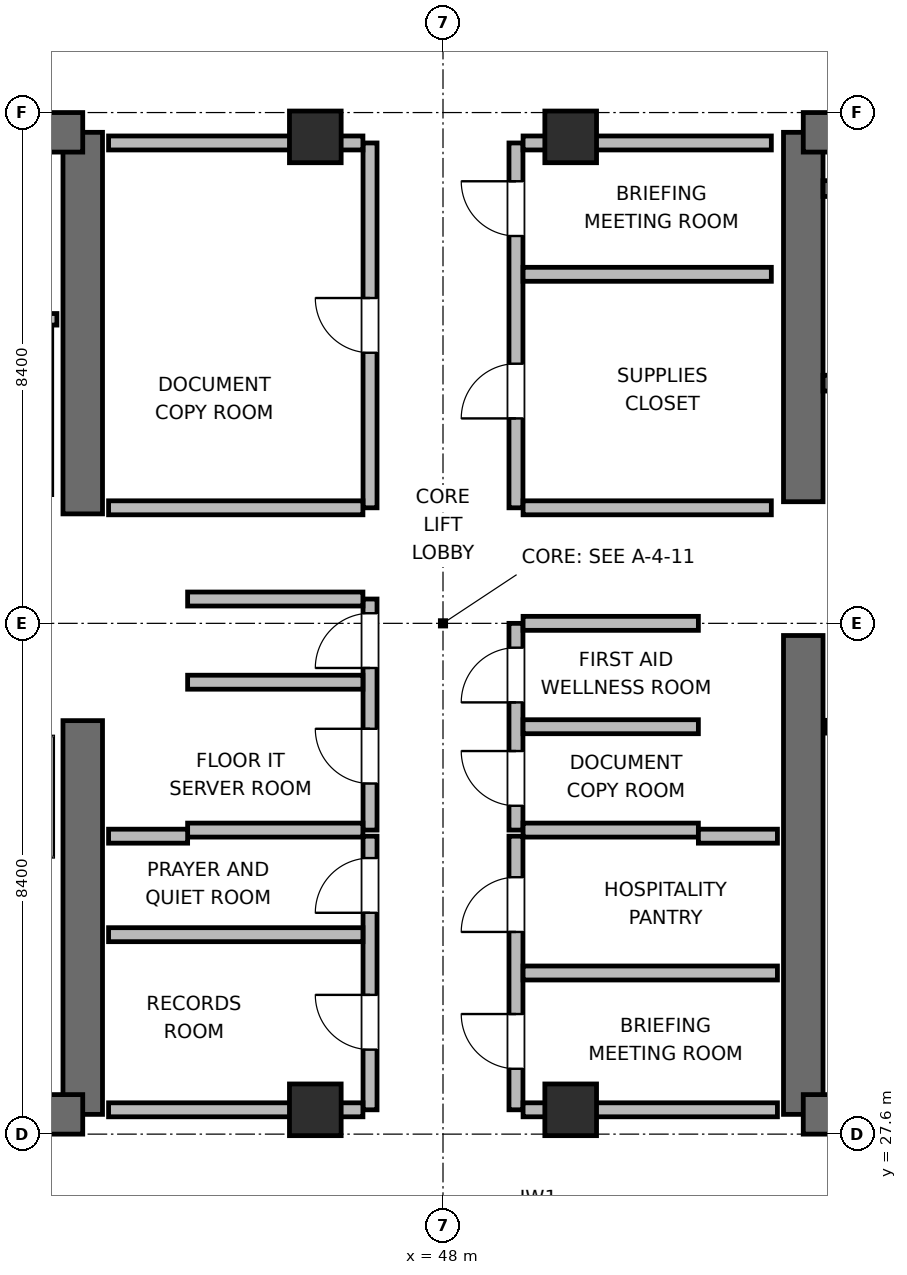
"""IFC4 building model, lengths in metres.
Left out: names, types, materials, properties, quantities, classifications, styles, units other than length and angle.
Written with IfcOpenShell. Run it as: python <this file> out.ifc"""

import sys

from ifc_helpers import new_model, si_unit, direction, frame, frame_2d, origin, origin_2d, place, context, subcontext, project, spatial, rectangle, extrude, element, fill, save


model = new_model("IFC4")
c1 = context("Model", 3, precision=1e-05, world=origin(), true_north=direction((0.0, 1.0)))
c2 = subcontext(c1, "Body", "Model", "MODEL_VIEW")
j1 = project(units=[si_unit("LENGTHUNIT", "METRE"), si_unit("PLANEANGLEUNIT", "RADIAN")], contexts=[c1])
p1 = place(None, origin())
s1 = spatial("IfcSite", under=j1, at=p1, CompositionType="ELEMENT")
p2 = place(p1, origin())
s2 = spatial("IfcBuilding", under=s1, at=p2, CompositionType="ELEMENT")
p3 = place(p2, frame((0.0, 0.0, 255.0)))
s3 = spatial("IfcBuildingStorey", under=s2, at=p3, CompositionType="ELEMENT", Elevation=255.0)
p4 = place(p3, frame((42.075, 27.925, 0.0), z_axis=(0.0, 0.0, 1.0), x_axis=(0.0, 1.0, 0.0)))
e1 = element("IfcWall", 1, at=p4, inside=s3, PredefinedType="SHEAR", context=c2, shape_type="SweptSolid", body=[
    extrude(rectangle(XDim=6.475, YDim=0.65, at=frame_2d((3.237, 0.0))), origin(), (0.0, 0.0, 1.0), 3.9),
])
p5 = place(p3, frame((42.075, 37.8, 0.0), z_axis=(0.0, 0.0, 1.0), x_axis=(0.0, 1.0, 0.0)))
e2 = element("IfcWall", 2, at=p5, inside=s3, PredefinedType="SHEAR", context=c2, shape_type="SweptSolid", body=[
    extrude(rectangle(XDim=6.275, YDim=0.65, at=frame_2d((3.137, 0.0))), origin(), (0.0, 0.0, 1.0), 3.9),
])
p6 = place(p3, frame((32.725, 27.925, 0.0), z_axis=(0.0, 0.0, 1.0), x_axis=(1.0, 0.0, 0.0)))
e3 = element("IfcWall", 3, at=p6, inside=s3, PredefinedType="SHEAR", context=c2, shape_type="SweptSolid", body=[
    extrude(rectangle(XDim=9.35, YDim=0.65, at=frame_2d((4.675, 0.0))), origin(), (0.0, 0.0, 1.0), 3.9),
])
p7 = place(p6, frame((5.075, 0.0, 0.0)))
e4 = element("IfcOpeningElement", 4, at=p7, cuts=e3, PredefinedType="OPENING", context=c2, shape_type="SweptSolid", body=[
    extrude(rectangle(XDim=1.05, YDim=2.04, at=frame_2d((0.525, 1.02))), frame((0.0, 0.335, 0.0), z_axis=(0.0, -1.0, 0.0), x_axis=(1.0, 0.0, 0.0)), (0.0, 0.0, 1.0), 0.67),
])
p8 = place(p3, frame((32.725, 44.075, 0.0), z_axis=(0.0, 0.0, 1.0), x_axis=(1.0, 0.0, 0.0)))
e5 = element("IfcWall", 5, at=p8, inside=s3, PredefinedType="SHEAR", context=c2, shape_type="SweptSolid", body=[
    extrude(rectangle(XDim=9.35, YDim=0.65, at=frame_2d((4.675, 0.0))), origin(), (0.0, 0.0, 1.0), 3.9),
])
p9 = place(p8, frame((1.075, 0.0, 0.0)))
e6 = element("IfcOpeningElement", 6, at=p9, cuts=e5, PredefinedType="OPENING", context=c2, shape_type="SweptSolid", body=[
    extrude(rectangle(XDim=0.95, YDim=2.04, at=frame_2d((0.475, 1.02))), frame((0.0, 0.335, 0.0), z_axis=(0.0, -1.0, 0.0), x_axis=(1.0, 0.0, 0.0)), (0.0, 0.0, 1.0), 0.67),
])
p10 = place(p8, frame((4.325, 0.0, 0.0)))
e7 = element("IfcOpeningElement", 7, at=p10, cuts=e5, PredefinedType="OPENING", context=c2, shape_type="SweptSolid", body=[
    extrude(rectangle(XDim=0.9, YDim=2.02, at=frame_2d((0.45, 1.01))), frame((0.0, 0.335, 0.0), z_axis=(0.0, -1.0, 0.0), x_axis=(1.0, 0.0, 0.0)), (0.0, 0.0, 1.0), 0.67),
])
p11 = place(p8, frame((7.225, 0.0, 0.0)))
e8 = element("IfcOpeningElement", 8, at=p11, cuts=e5, PredefinedType="OPENING", context=c2, shape_type="SweptSolid", body=[
    extrude(rectangle(XDim=0.9, YDim=2.02, at=frame_2d((0.45, 1.01))), frame((0.0, 0.335, 0.0), z_axis=(0.0, -1.0, 0.0), x_axis=(1.0, 0.0, 0.0)), (0.0, 0.0, 1.0), 0.67),
])
p12 = place(p3, frame((53.925, 27.925, 0.0), z_axis=(0.0, 0.0, 1.0), x_axis=(0.0, 1.0, 0.0)))
e9 = element("IfcWall", 9, at=p12, inside=s3, PredefinedType="SHEAR", context=c2, shape_type="SweptSolid", body=[
    extrude(rectangle(XDim=7.875, YDim=0.65, at=frame_2d((3.938, 0.0))), origin(), (0.0, 0.0, 1.0), 3.9),
])
p13 = place(p3, frame((53.925, 38.0, 0.0), z_axis=(0.0, 0.0, 1.0), x_axis=(0.0, 1.0, 0.0)))
e10 = element("IfcWall", 10, at=p13, inside=s3, PredefinedType="SHEAR", context=c2, shape_type="SweptSolid", body=[
    extrude(rectangle(XDim=6.075, YDim=0.65, at=frame_2d((3.038, 0.0))), origin(), (0.0, 0.0, 1.0), 3.9),
])
p14 = place(p3, frame((53.925, 27.925, 0.0), z_axis=(0.0, 0.0, 1.0), x_axis=(1.0, 0.0, 0.0)))
e11 = element("IfcWall", 11, at=p14, inside=s3, PredefinedType="SHEAR", context=c2, shape_type="SweptSolid", body=[
    extrude(rectangle(XDim=9.35, YDim=0.65, at=frame_2d((4.675, 0.0))), origin(), (0.0, 0.0, 1.0), 3.9),
])
p15 = place(p14, frame((4.025, 0.0, 0.0)))
e12 = element("IfcOpeningElement", 12, at=p15, cuts=e11, PredefinedType="OPENING", context=c2, shape_type="SweptSolid", body=[
    extrude(rectangle(XDim=1.05, YDim=2.04, at=frame_2d((0.525, 1.02))), frame((0.0, 0.335, 0.0), z_axis=(0.0, -1.0, 0.0), x_axis=(1.0, 0.0, 0.0)), (0.0, 0.0, 1.0), 0.67),
])
p16 = place(p3, frame((53.925, 44.075, 0.0), z_axis=(0.0, 0.0, 1.0), x_axis=(1.0, 0.0, 0.0)))
e13 = element("IfcWall", 13, at=p16, inside=s3, PredefinedType="SHEAR", context=c2, shape_type="SweptSolid", body=[
    extrude(rectangle(XDim=9.35, YDim=0.65, at=frame_2d((4.675, 0.0))), origin(), (0.0, 0.0, 1.0), 3.9),
])
p17 = place(p3, frame((54.25, 39.95, 0.0), z_axis=(0.0, 0.0, 1.0), x_axis=(1.0, 0.0, 0.0)))
e14 = element("IfcWall", 14, at=p17, inside=s3, PredefinedType="SHEAR", context=c2, shape_type="SweptSolid", body=[
    extrude(rectangle(XDim=8.7, YDim=0.26, at=frame_2d((4.35, 0.0))), origin(), (0.0, 0.0, 1.0), 3.9),
])
p18 = place(p17, frame((0.95, 0.0, 0.0)))
e15 = element("IfcOpeningElement", 15, at=p18, cuts=e14, PredefinedType="OPENING", context=c2, shape_type="SweptSolid", body=[
    extrude(rectangle(XDim=1.0, YDim=2.04, at=frame_2d((0.5, 1.02))), frame((0.0, 0.14, 0.0), z_axis=(0.0, -1.0, 0.0), x_axis=(1.0, 0.0, 0.0)), (0.0, 0.0, 1.0), 0.28),
])
p19 = place(p3, frame((54.25, 43.15, 0.0), z_axis=(0.0, 0.0, 1.0), x_axis=(1.0, 0.0, 0.0)))
e16 = element("IfcWall", 16, at=p19, inside=s3, PredefinedType="SHEAR", context=c2, shape_type="SweptSolid", body=[
    extrude(rectangle(XDim=8.7, YDim=0.26, at=frame_2d((4.35, 0.0))), origin(), (0.0, 0.0, 1.0), 3.9),
])
for number, where, z_axis, x_axis in (
    (17, (45.9, 28.0, 0.0), (0.0, 0.0, 1.0), (1.0, 0.0, 0.0)),
    (18, (50.1, 28.0, 0.0), (0.0, 0.0, 1.0), (1.0, 0.0, 0.0)),
    (19, (45.9, 44.0, 0.0), (0.0, 0.0, 1.0), (1.0, 0.0, 0.0)),
    (20, (50.1, 44.0, 0.0), (0.0, 0.0, 1.0), (1.0, 0.0, 0.0)),
):
    element("IfcColumn", number, at=place(p3, frame(where, z_axis=z_axis, x_axis=x_axis)), inside=s3, PredefinedType="COLUMN", context=c2, shape_type="SweptSolid", body=[
        extrude(rectangle(XDim=0.85, YDim=0.85, at=origin_2d()), origin(), (0.0, 0.0, 1.0), 3.9),
    ])
p20 = place(p3, frame((33.15, 41.0, 0.0), z_axis=(0.0, 0.0, 1.0), x_axis=(1.0, 0.0, 0.0)))
e21 = element("IfcWall", 21, at=p20, inside=s3, PredefinedType="PLUMBINGWALL", context=c2, shape_type="SweptSolid", body=[
    extrude(rectangle(XDim=8.5, YDim=0.19, at=frame_2d((4.25, 0.0))), origin(), (0.0, 0.0, 1.0), 3.68),
])
p21 = place(p3, frame((46.8, 32.6, 0.0), z_axis=(0.0, 0.0, 1.0), x_axis=(0.0, 1.0, 0.0)))
e22 = element("IfcWall", 22, at=p21, inside=s3, PredefinedType="PARTITIONING", context=c2, shape_type="SweptSolid", body=[
    extrude(rectangle(XDim=3.8, YDim=0.23, at=frame_2d((1.9, 0.0))), origin(), (0.0, 0.0, 1.0), 3.68),
])
p22 = place(p21, frame((0.766, 0.0, 0.0)))
e23 = element("IfcOpeningElement", 23, at=p22, cuts=e22, PredefinedType="OPENING", context=c2, shape_type="SweptSolid", body=[
    extrude(rectangle(XDim=0.9, YDim=2.02, at=frame_2d((0.45, 1.01))), frame((0.0, 0.125, 0.0), z_axis=(0.0, -1.0, 0.0), x_axis=(1.0, 0.0, 0.0)), (0.0, 0.0, 1.0), 0.25),
])
p23 = place(p21, frame((2.666, 0.0, 0.0)))
e24 = element("IfcOpeningElement", 24, at=p23, cuts=e22, PredefinedType="OPENING", context=c2, shape_type="SweptSolid", body=[
    extrude(rectangle(XDim=0.9, YDim=2.02, at=frame_2d((0.45, 1.01))), frame((0.0, 0.125, 0.0), z_axis=(0.0, -1.0, 0.0), x_axis=(1.0, 0.0, 0.0)), (0.0, 0.0, 1.0), 0.25),
])
for number, where, z_axis, x_axis in (
    (25, (43.8, 32.6, 0.0), (0.0, 0.0, 1.0), (1.0, 0.0, 0.0)),
    (26, (43.8, 36.4, 0.0), (0.0, 0.0, 1.0), (1.0, 0.0, 0.0)),
    (27, (43.8, 35.032, 0.0), (0.0, 0.0, 1.0), (1.0, 0.0, 0.0)),
):
    element("IfcWall", number, at=place(p3, frame(where, z_axis=z_axis, x_axis=x_axis)), inside=s3, PredefinedType="PARTITIONING", context=c2, shape_type="SweptSolid", body=[
        extrude(rectangle(XDim=2.883, YDim=0.23, at=frame_2d((1.441, 0.0))), origin(), (0.0, 0.0, 1.0), 3.68),
    ])
p24 = place(p3, frame((49.2, 32.6, 0.0), z_axis=(0.0, 0.0, 1.0), x_axis=(0.0, 1.0, 0.0)))
e28 = element("IfcWall", 28, at=p24, inside=s3, PredefinedType="PARTITIONING", context=c2, shape_type="SweptSolid", body=[
    extrude(rectangle(XDim=3.4, YDim=0.23, at=frame_2d((1.7, 0.0))), origin(), (0.0, 0.0, 1.0), 3.68),
])
p25 = place(p24, frame((0.4, 0.0, 0.0)))
e29 = element("IfcOpeningElement", 29, at=p25, cuts=e28, PredefinedType="OPENING", context=c2, shape_type="SweptSolid", body=[
    extrude(rectangle(XDim=0.9, YDim=2.02, at=frame_2d((0.45, 1.01))), frame((0.0, 0.125, 0.0), z_axis=(0.0, -1.0, 0.0), x_axis=(1.0, 0.0, 0.0)), (0.0, 0.0, 1.0), 0.25),
])
p26 = place(p24, frame((2.1, 0.0, 0.0)))
e30 = element("IfcOpeningElement", 30, at=p26, cuts=e28, PredefinedType="OPENING", context=c2, shape_type="SweptSolid", body=[
    extrude(rectangle(XDim=0.9, YDim=2.02, at=frame_2d((0.45, 1.01))), frame((0.0, 0.125, 0.0), z_axis=(0.0, -1.0, 0.0), x_axis=(1.0, 0.0, 0.0)), (0.0, 0.0, 1.0), 0.25),
])
for number, where, z_axis, x_axis in (
    (31, (49.317, 32.6, 0.0), (0.0, 0.0, 1.0), (1.0, 0.0, 0.0)),
    (32, (49.317, 36.0, 0.0), (0.0, 0.0, 1.0), (1.0, 0.0, 0.0)),
    (33, (49.317, 34.3, 0.0), (0.0, 0.0, 1.0), (1.0, 0.0, 0.0)),
):
    element("IfcWall", number, at=place(p3, frame(where, z_axis=z_axis, x_axis=x_axis)), inside=s3, PredefinedType="PARTITIONING", context=c2, shape_type="SweptSolid", body=[
        extrude(rectangle(XDim=2.883, YDim=0.23, at=frame_2d((1.441, 0.0))), origin(), (0.0, 0.0, 1.0), 3.68),
    ])
p27 = place(p3, frame((46.8, 28.0, 0.0), z_axis=(0.0, 0.0, 1.0), x_axis=(0.0, 1.0, 0.0)))
e34 = element("IfcWall", 34, at=p27, inside=s3, PredefinedType="PARTITIONING", context=c2, shape_type="SweptSolid", body=[
    extrude(rectangle(XDim=4.5, YDim=0.23, at=frame_2d((2.25, 0.0))), origin(), (0.0, 0.0, 1.0), 3.68),
])
p28 = place(p27, frame((0.99, 0.0, 0.0)))
e35 = element("IfcOpeningElement", 35, at=p28, cuts=e34, PredefinedType="OPENING", context=c2, shape_type="SweptSolid", body=[
    extrude(rectangle(XDim=0.9, YDim=2.02, at=frame_2d((0.45, 1.01))), frame((0.0, 0.125, 0.0), z_axis=(0.0, -1.0, 0.0), x_axis=(1.0, 0.0, 0.0)), (0.0, 0.0, 1.0), 0.25),
])
p29 = place(p27, frame((3.24, 0.0, 0.0)))
e36 = element("IfcOpeningElement", 36, at=p29, cuts=e34, PredefinedType="OPENING", context=c2, shape_type="SweptSolid", body=[
    extrude(rectangle(XDim=0.9, YDim=2.02, at=frame_2d((0.45, 1.01))), frame((0.0, 0.125, 0.0), z_axis=(0.0, -1.0, 0.0), x_axis=(1.0, 0.0, 0.0)), (0.0, 0.0, 1.0), 0.25),
])
p30 = place(p3, frame((42.5, 28.0, 0.0), z_axis=(0.0, 0.0, 1.0), x_axis=(1.0, 0.0, 0.0)))
e37 = element("IfcWall", 37, at=p30, inside=s3, PredefinedType="PARTITIONING", context=c2, shape_type="SweptSolid", body=[
    extrude(rectangle(XDim=4.183, YDim=0.23, at=frame_2d((2.092, 0.0))), origin(), (0.0, 0.0, 1.0), 2.765),
])
p31 = place(p3, frame((42.5, 32.5, 0.0), z_axis=(0.0, 0.0, 1.0), x_axis=(1.0, 0.0, 0.0)))
e38 = element("IfcWall", 38, at=p31, inside=s3, PredefinedType="PARTITIONING", context=c2, shape_type="SweptSolid", body=[
    extrude(rectangle(XDim=1.3, YDim=0.23, at=frame_2d((0.65, 0.0))), origin(), (0.0, 0.0, 1.0), 3.68),
])
p32 = place(p3, frame((42.5, 30.88, 0.0), z_axis=(0.0, 0.0, 1.0), x_axis=(1.0, 0.0, 0.0)))
e39 = element("IfcWall", 39, at=p32, inside=s3, PredefinedType="PARTITIONING", context=c2, shape_type="SweptSolid", body=[
    extrude(rectangle(XDim=4.183, YDim=0.23, at=frame_2d((2.092, 0.0))), origin(), (0.0, 0.0, 1.0), 3.68),
])
p33 = place(p3, frame((49.2, 28.0, 0.0), z_axis=(0.0, 0.0, 1.0), x_axis=(0.0, 1.0, 0.0)))
e40 = element("IfcWall", 40, at=p33, inside=s3, PredefinedType="PARTITIONING", context=c2, shape_type="SweptSolid", body=[
    extrude(rectangle(XDim=4.5, YDim=0.23, at=frame_2d((2.25, 0.0))), origin(), (0.0, 0.0, 1.0), 3.68),
])
p34 = place(p33, frame((0.675, 0.0, 0.0)))
e41 = element("IfcOpeningElement", 41, at=p34, cuts=e40, PredefinedType="OPENING", context=c2, shape_type="SweptSolid", body=[
    extrude(rectangle(XDim=0.9, YDim=2.02, at=frame_2d((0.45, 1.01))), frame((0.0, 0.125, 0.0), z_axis=(0.0, -1.0, 0.0), x_axis=(1.0, 0.0, 0.0)), (0.0, 0.0, 1.0), 0.25),
])
p35 = place(p33, frame((2.925, 0.0, 0.0)))
e42 = element("IfcOpeningElement", 42, at=p35, cuts=e40, PredefinedType="OPENING", context=c2, shape_type="SweptSolid", body=[
    extrude(rectangle(XDim=0.9, YDim=2.02, at=frame_2d((0.45, 1.01))), frame((0.0, 0.125, 0.0), z_axis=(0.0, -1.0, 0.0), x_axis=(1.0, 0.0, 0.0)), (0.0, 0.0, 1.0), 0.25),
])
p36 = place(p3, frame((49.317, 28.0, 0.0), z_axis=(0.0, 0.0, 1.0), x_axis=(1.0, 0.0, 0.0)))
e43 = element("IfcWall", 43, at=p36, inside=s3, PredefinedType="PARTITIONING", context=c2, shape_type="SweptSolid", body=[
    extrude(rectangle(XDim=4.183, YDim=0.23, at=frame_2d((2.092, 0.0))), origin(), (0.0, 0.0, 1.0), 2.765),
])
p37 = place(p3, frame((52.2, 32.5, 0.0), z_axis=(0.0, 0.0, 1.0), x_axis=(1.0, 0.0, 0.0)))
e44 = element("IfcWall", 44, at=p37, inside=s3, PredefinedType="PARTITIONING", context=c2, shape_type="SweptSolid", body=[
    extrude(rectangle(XDim=1.3, YDim=0.23, at=frame_2d((0.65, 0.0))), origin(), (0.0, 0.0, 1.0), 3.68),
])
p38 = place(p3, frame((49.317, 30.25, 0.0), z_axis=(0.0, 0.0, 1.0), x_axis=(1.0, 0.0, 0.0)))
e45 = element("IfcWall", 45, at=p38, inside=s3, PredefinedType="PARTITIONING", context=c2, shape_type="SweptSolid", body=[
    extrude(rectangle(XDim=4.183, YDim=0.23, at=frame_2d((2.092, 0.0))), origin(), (0.0, 0.0, 1.0), 3.68),
])
p39 = place(p3, frame((46.8, 37.9, 0.0), z_axis=(0.0, 0.0, 1.0), x_axis=(0.0, 1.0, 0.0)))
e46 = element("IfcWall", 46, at=p39, inside=s3, PredefinedType="PARTITIONING", context=c2, shape_type="SweptSolid", body=[
    extrude(rectangle(XDim=6.0, YDim=0.23, at=frame_2d((3.0, 0.0))), origin(), (0.0, 0.0, 1.0), 3.68),
])
p40 = place(p39, frame((2.55, 0.0, 0.0)))
e47 = element("IfcOpeningElement", 47, at=p40, cuts=e46, PredefinedType="OPENING", context=c2, shape_type="SweptSolid", body=[
    extrude(rectangle(XDim=0.9, YDim=2.02, at=frame_2d((0.45, 1.01))), frame((0.0, 0.125, 0.0), z_axis=(0.0, -1.0, 0.0), x_axis=(1.0, 0.0, 0.0)), (0.0, 0.0, 1.0), 0.25),
])
p41 = place(p3, frame((42.5, 37.9, 0.0), z_axis=(0.0, 0.0, 1.0), x_axis=(1.0, 0.0, 0.0)))
e48 = element("IfcWall", 48, at=p41, inside=s3, PredefinedType="PARTITIONING", context=c2, shape_type="SweptSolid", body=[
    extrude(rectangle(XDim=4.183, YDim=0.23, at=frame_2d((2.092, 0.0))), origin(), (0.0, 0.0, 1.0), 3.68),
])
p42 = place(p3, frame((42.5, 43.9, 0.0), z_axis=(0.0, 0.0, 1.0), x_axis=(1.0, 0.0, 0.0)))
e49 = element("IfcWall", 49, at=p42, inside=s3, PredefinedType="PARTITIONING", context=c2, shape_type="SweptSolid", body=[
    extrude(rectangle(XDim=4.183, YDim=0.23, at=frame_2d((2.092, 0.0))), origin(), (0.0, 0.0, 1.0), 2.765),
])
p43 = place(p3, frame((49.2, 37.9, 0.0), z_axis=(0.0, 0.0, 1.0), x_axis=(0.0, 1.0, 0.0)))
e50 = element("IfcWall", 50, at=p43, inside=s3, PredefinedType="PARTITIONING", context=c2, shape_type="SweptSolid", body=[
    extrude(rectangle(XDim=6.0, YDim=0.23, at=frame_2d((3.0, 0.0))), origin(), (0.0, 0.0, 1.0), 3.68),
])
p44 = place(p43, frame((1.47, 0.0, 0.0)))
e51 = element("IfcOpeningElement", 51, at=p44, cuts=e50, PredefinedType="OPENING", context=c2, shape_type="SweptSolid", body=[
    extrude(rectangle(XDim=0.9, YDim=2.02, at=frame_2d((0.45, 1.01))), frame((0.0, 0.125, 0.0), z_axis=(0.0, -1.0, 0.0), x_axis=(1.0, 0.0, 0.0)), (0.0, 0.0, 1.0), 0.25),
])
p45 = place(p43, frame((4.47, 0.0, 0.0)))
e52 = element("IfcOpeningElement", 52, at=p45, cuts=e50, PredefinedType="OPENING", context=c2, shape_type="SweptSolid", body=[
    extrude(rectangle(XDim=0.9, YDim=2.02, at=frame_2d((0.45, 1.01))), frame((0.0, 0.125, 0.0), z_axis=(0.0, -1.0, 0.0), x_axis=(1.0, 0.0, 0.0)), (0.0, 0.0, 1.0), 0.25),
])
p46 = place(p3, frame((49.317, 37.9, 0.0), z_axis=(0.0, 0.0, 1.0), x_axis=(1.0, 0.0, 0.0)))
e53 = element("IfcWall", 53, at=p46, inside=s3, PredefinedType="PARTITIONING", context=c2, shape_type="SweptSolid", body=[
    extrude(rectangle(XDim=4.083, YDim=0.23, at=frame_2d((2.042, 0.0))), origin(), (0.0, 0.0, 1.0), 3.68),
])
p47 = place(p3, frame((49.317, 43.9, 0.0), z_axis=(0.0, 0.0, 1.0), x_axis=(1.0, 0.0, 0.0)))
e54 = element("IfcWall", 54, at=p47, inside=s3, PredefinedType="PARTITIONING", context=c2, shape_type="SweptSolid", body=[
    extrude(rectangle(XDim=4.083, YDim=0.23, at=frame_2d((2.042, 0.0))), origin(), (0.0, 0.0, 1.0), 2.765),
])
p48 = place(p3, frame((49.317, 41.74, 0.0), z_axis=(0.0, 0.0, 1.0), x_axis=(1.0, 0.0, 0.0)))
e55 = element("IfcWall", 55, at=p48, inside=s3, PredefinedType="PARTITIONING", context=c2, shape_type="SweptSolid", body=[
    extrude(rectangle(XDim=4.083, YDim=0.23, at=frame_2d((2.042, 0.0))), origin(), (0.0, 0.0, 1.0), 3.68),
])
p49 = place(p22, origin())
e56 = element("IfcDoor", 56, at=p49, inside=s3, OperationType="SINGLE_SWING_RIGHT", PredefinedType="DOOR", context=c2, shape_type="SweptSolid", body=[
    extrude(rectangle(XDim=0.9, YDim=2.02, at=frame_2d((0.45, 1.01))), frame((0.0, 0.025, 0.0), z_axis=(0.0, -1.0, 0.0), x_axis=(1.0, 0.0, 0.0)), (0.0, 0.0, 1.0), 0.05),
])
fill(e23, e56)
p50 = place(p23, origin())
e57 = element("IfcDoor", 57, at=p50, inside=s3, OperationType="SINGLE_SWING_LEFT", PredefinedType="DOOR", context=c2, shape_type="SweptSolid", body=[
    extrude(rectangle(XDim=0.9, YDim=2.02, at=frame_2d((0.45, 1.01))), frame((0.0, 0.025, 0.0), z_axis=(0.0, -1.0, 0.0), x_axis=(1.0, 0.0, 0.0)), (0.0, 0.0, 1.0), 0.05),
])
fill(e24, e57)
p51 = place(p25, origin())
e58 = element("IfcDoor", 58, at=p51, inside=s3, OperationType="SINGLE_SWING_RIGHT", PredefinedType="DOOR", context=c2, shape_type="SweptSolid", body=[
    extrude(rectangle(XDim=0.9, YDim=2.02, at=frame_2d((0.45, 1.01))), frame((0.0, 0.025, 0.0), z_axis=(0.0, -1.0, 0.0), x_axis=(1.0, 0.0, 0.0)), (0.0, 0.0, 1.0), 0.05),
])
fill(e29, e58)
p52 = place(p26, origin())
e59 = element("IfcDoor", 59, at=p52, inside=s3, OperationType="SINGLE_SWING_LEFT", PredefinedType="DOOR", context=c2, shape_type="SweptSolid", body=[
    extrude(rectangle(XDim=0.9, YDim=2.02, at=frame_2d((0.45, 1.01))), frame((0.0, 0.025, 0.0), z_axis=(0.0, -1.0, 0.0), x_axis=(1.0, 0.0, 0.0)), (0.0, 0.0, 1.0), 0.05),
])
fill(e30, e59)
p53 = place(p28, origin())
e60 = element("IfcDoor", 60, at=p53, inside=s3, OperationType="SINGLE_SWING_RIGHT", PredefinedType="DOOR", context=c2, shape_type="SweptSolid", body=[
    extrude(rectangle(XDim=0.9, YDim=2.02, at=frame_2d((0.45, 1.01))), frame((0.0, 0.025, 0.0), z_axis=(0.0, -1.0, 0.0), x_axis=(1.0, 0.0, 0.0)), (0.0, 0.0, 1.0), 0.05),
])
fill(e35, e60)
p54 = place(p29, origin())
e61 = element("IfcDoor", 61, at=p54, inside=s3, OperationType="SINGLE_SWING_LEFT", PredefinedType="DOOR", context=c2, shape_type="SweptSolid", body=[
    extrude(rectangle(XDim=0.9, YDim=2.02, at=frame_2d((0.45, 1.01))), frame((0.0, 0.025, 0.0), z_axis=(0.0, -1.0, 0.0), x_axis=(1.0, 0.0, 0.0)), (0.0, 0.0, 1.0), 0.05),
])
fill(e36, e61)
p55 = place(p34, origin())
e62 = element("IfcDoor", 62, at=p55, inside=s3, OperationType="SINGLE_SWING_RIGHT", PredefinedType="DOOR", context=c2, shape_type="SweptSolid", body=[
    extrude(rectangle(XDim=0.9, YDim=2.02, at=frame_2d((0.45, 1.01))), frame((0.0, 0.025, 0.0), z_axis=(0.0, -1.0, 0.0), x_axis=(1.0, 0.0, 0.0)), (0.0, 0.0, 1.0), 0.05),
])
fill(e41, e62)
p56 = place(p35, origin())
e63 = element("IfcDoor", 63, at=p56, inside=s3, OperationType="SINGLE_SWING_LEFT", PredefinedType="DOOR", context=c2, shape_type="SweptSolid", body=[
    extrude(rectangle(XDim=0.9, YDim=2.02, at=frame_2d((0.45, 1.01))), frame((0.0, 0.025, 0.0), z_axis=(0.0, -1.0, 0.0), x_axis=(1.0, 0.0, 0.0)), (0.0, 0.0, 1.0), 0.05),
])
fill(e42, e63)
p57 = place(p40, origin())
e64 = element("IfcDoor", 64, at=p57, inside=s3, OperationType="SINGLE_SWING_RIGHT", PredefinedType="DOOR", context=c2, shape_type="SweptSolid", body=[
    extrude(rectangle(XDim=0.9, YDim=2.02, at=frame_2d((0.45, 1.01))), frame((0.0, 0.025, 0.0), z_axis=(0.0, -1.0, 0.0), x_axis=(1.0, 0.0, 0.0)), (0.0, 0.0, 1.0), 0.05),
])
fill(e47, e64)
p58 = place(p44, origin())
e65 = element("IfcDoor", 65, at=p58, inside=s3, OperationType="SINGLE_SWING_LEFT", PredefinedType="DOOR", context=c2, shape_type="SweptSolid", body=[
    extrude(rectangle(XDim=0.9, YDim=2.02, at=frame_2d((0.45, 1.01))), frame((0.0, 0.025, 0.0), z_axis=(0.0, -1.0, 0.0), x_axis=(1.0, 0.0, 0.0)), (0.0, 0.0, 1.0), 0.05),
])
fill(e51, e65)
p59 = place(p45, origin())
e66 = element("IfcDoor", 66, at=p59, inside=s3, OperationType="SINGLE_SWING_RIGHT", PredefinedType="DOOR", context=c2, shape_type="SweptSolid", body=[
    extrude(rectangle(XDim=0.9, YDim=2.02, at=frame_2d((0.45, 1.01))), frame((0.0, 0.025, 0.0), z_axis=(0.0, -1.0, 0.0), x_axis=(1.0, 0.0, 0.0)), (0.0, 0.0, 1.0), 0.05),
])
fill(e52, e66)
save(model, sys.argv[1])
